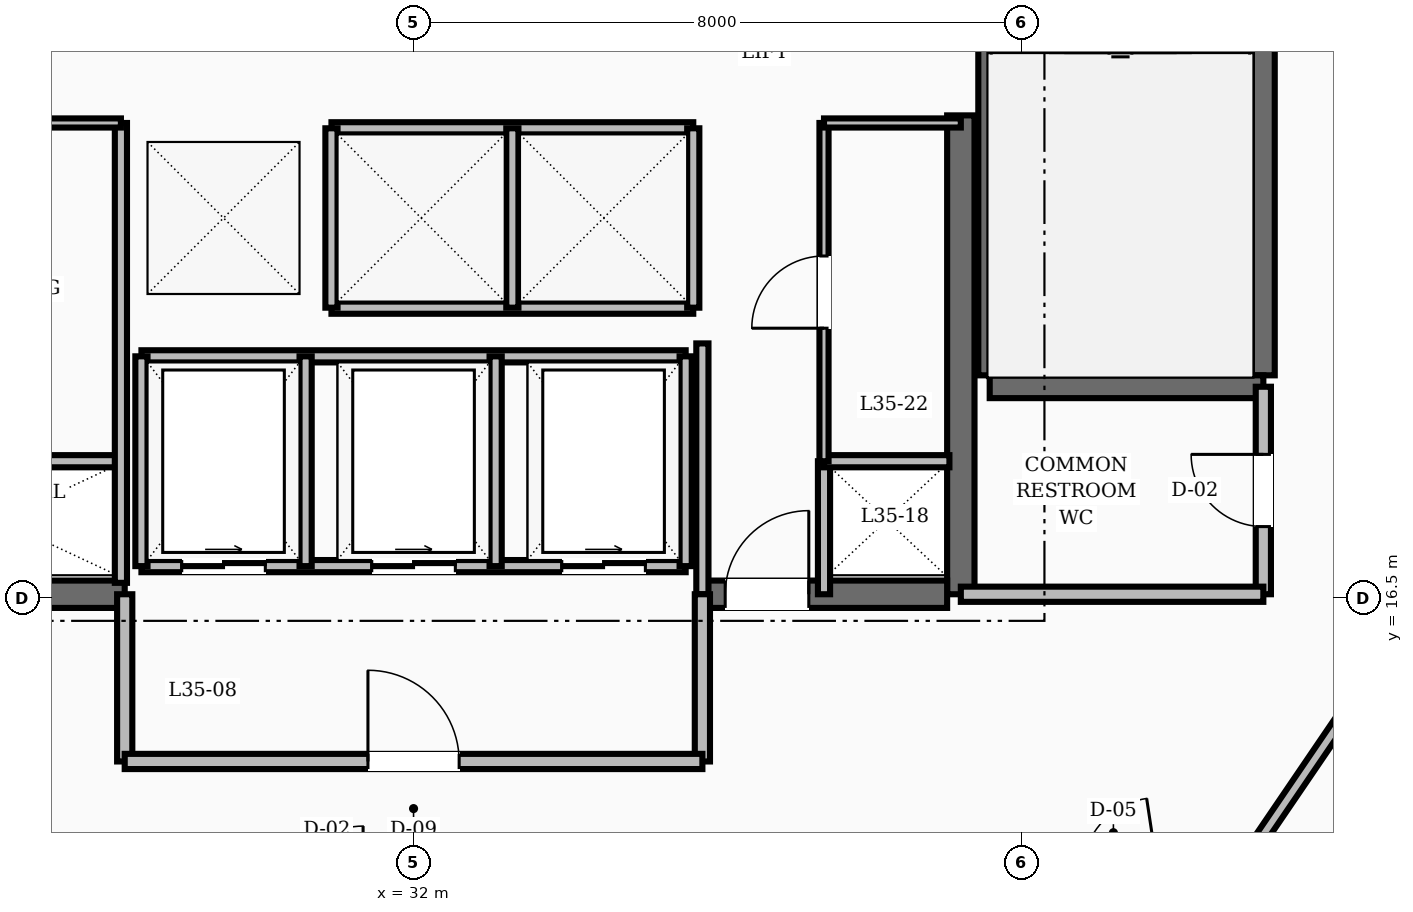
"""IFC4 building model, lengths in metres.
Left out: names, types, materials, properties, quantities, classifications, styles, units other than length and angle.
Written with IfcOpenShell. Run it as: python <this file> out.ifc"""

import sys

from ifc_helpers import new_model, si_unit, direction, frame, frame_2d, origin, place, context, subcontext, project, spatial, rectangle, extrude, element, fill, save


model = new_model("IFC4")
c1 = context("Model", 3, precision=1e-05, world=origin(), true_north=direction((0.0, 1.0)))
c2 = subcontext(c1, "Body", "Model", "MODEL_VIEW")
j1 = project(units=[si_unit("LENGTHUNIT", "METRE"), si_unit("PLANEANGLEUNIT", "RADIAN")], contexts=[c1])
p1 = place(None, origin())
s1 = spatial("IfcSite", under=j1, at=p1, CompositionType="ELEMENT")
p2 = place(p1, origin())
s2 = spatial("IfcBuilding", under=s1, at=p2, CompositionType="ELEMENT")
p3 = place(p2, frame((0.0, 0.0, 138.8)))
s3 = spatial("IfcBuildingStorey", under=s2, at=p3, CompositionType="ELEMENT", Elevation=138.8)
p4 = place(p3, frame((39.2, 16.55, 0.0), z_axis=(0.0, 0.0, 1.0), x_axis=(0.0, 1.0, 0.0)))
e1 = element("IfcWall", 1, at=p4, inside=s3, PredefinedType="SHEAR", context=c2, shape_type="SweptSolid", body=[
    extrude(rectangle(XDim=6.3, YDim=0.36, at=frame_2d((3.15, 0.0))), origin(), (0.0, 0.0, 1.0), 3.6),
])
p5 = place(p3, frame((24.98, 16.55, 0.0), z_axis=(0.0, 0.0, 1.0), x_axis=(1.0, 0.0, 0.0)))
e2 = element("IfcWall", 2, at=p5, inside=s3, PredefinedType="SHEAR", context=c2, shape_type="SweptSolid", body=[
    extrude(rectangle(XDim=3.22, YDim=0.36, at=frame_2d((1.61, 0.0))), origin(), (0.0, 0.0, 1.0), 3.6),
])
p6 = place(p3, frame((35.8, 16.55, 0.0), z_axis=(0.0, 0.0, 1.0), x_axis=(1.0, 0.0, 0.0)))
e3 = element("IfcWall", 3, at=p6, inside=s3, PredefinedType="SHEAR", context=c2, shape_type="SweptSolid", body=[
    extrude(rectangle(XDim=3.22, YDim=0.36, at=frame_2d((1.61, 0.0))), origin(), (0.0, 0.0, 1.0), 3.6),
])
p7 = place(p6, frame((0.3, 0.0, 0.0)))
e4 = element("IfcOpeningElement", 4, at=p7, cuts=e3, PredefinedType="OPENING", context=c2, shape_type="SweptSolid", body=[
    extrude(rectangle(XDim=1.1, YDim=2.1, at=frame_2d((0.55, 1.05))), frame((0.0, 0.19, 0.0), z_axis=(0.0, -1.0, 0.0), x_axis=(1.0, 0.0, 0.0)), (0.0, 0.0, 1.0), 0.38),
])
for number, where, z_axis, x_axis in (
    (5, (43.18, 19.43, 0.0), (0.0, 0.0, 1.0), (0.0, 1.0, 0.0)),
    (6, (39.58, 19.43, 0.0), (0.0, 0.0, 1.0), (0.0, 1.0, 0.0)),
):
    element("IfcWall", number, at=place(p3, frame(where, z_axis=z_axis, x_axis=x_axis)), inside=s3, PredefinedType="SHEAR", context=c2, shape_type="SweptSolid", body=[
        extrude(rectangle(XDim=8.74, YDim=0.3, at=frame_2d((4.37, 0.0))), origin(), (0.0, 0.0, 1.0), 3.6),
    ])
p8 = place(p3, frame((39.58, 19.28, 0.0), z_axis=(0.0, 0.0, 1.0), x_axis=(1.0, 0.0, 0.0)))
e7 = element("IfcWall", 7, at=p8, inside=s3, PredefinedType="SHEAR", context=c2, shape_type="SweptSolid", body=[
    extrude(rectangle(XDim=3.6, YDim=0.3, at=frame_2d((1.8, 0.0))), origin(), (0.0, 0.0, 1.0), 3.6),
])
p9 = place(p3, frame((43.18, 16.55, 0.0), z_axis=(0.0, 0.0, 1.0), x_axis=(0.0, 1.0, 0.0)))
e8 = element("IfcWall", 8, at=p9, inside=s3, PredefinedType="SOLIDWALL", context=c2, shape_type="SweptSolid", body=[
    extrude(rectangle(XDim=2.73, YDim=0.2, at=frame_2d((1.365, 0.0))), origin(), (0.0, 0.0, 1.0), 2.8),
])
p10 = place(p9, frame((0.89, 0.0, 0.0)))
e9 = element("IfcOpeningElement", 9, at=p10, cuts=e8, PredefinedType="OPENING", context=c2, shape_type="SweptSolid", body=[
    extrude(rectangle(XDim=0.95, YDim=2.1, at=frame_2d((0.475, 1.05))), frame((0.0, 0.11, 0.0), z_axis=(0.0, -1.0, 0.0), x_axis=(1.0, 0.0, 0.0)), (0.0, 0.0, 1.0), 0.22),
])
p11 = place(p3, frame((39.2, 16.55, 0.0), z_axis=(0.0, 0.0, 1.0), x_axis=(1.0, 0.0, 0.0)))
e10 = element("IfcWall", 10, at=p11, inside=s3, PredefinedType="SOLIDWALL", context=c2, shape_type="SweptSolid", body=[
    extrude(rectangle(XDim=3.98, YDim=0.2, at=frame_2d((1.99, 0.0))), origin(), (0.0, 0.0, 1.0), 2.8),
])
p12 = place(p3, frame((35.8, 16.55, 0.0), z_axis=(0.0, 0.0, 1.0), x_axis=(0.0, 1.0, 0.0)))
e11 = element("IfcWall", 11, at=p12, inside=s3, PredefinedType="SOLIDWALL", context=c2, shape_type="SweptSolid", body=[
    extrude(rectangle(XDim=3.3, YDim=0.16, at=frame_2d((1.65, 0.0))), origin(), (0.0, 0.0, 1.0), 2.8),
])
p13 = place(p3, frame((37.4, 16.55, 0.0), z_axis=(0.0, 0.0, 1.0), x_axis=(0.0, 1.0, 0.0)))
e12 = element("IfcWall", 12, at=p13, inside=s3, PredefinedType="SOLIDWALL", context=c2, shape_type="SweptSolid", body=[
    extrude(rectangle(XDim=1.75, YDim=0.16, at=frame_2d((0.875, 0.0))), origin(), (0.0, 0.0, 1.0), 2.8),
])
for number, where, z_axis, x_axis in (
    (13, (28.2, 14.35, 0.0), (0.0, 0.0, 1.0), (0.0, 1.0, 0.0)),
    (14, (35.8, 14.35, 0.0), (0.0, 0.0, 1.0), (0.0, 1.0, 0.0)),
):
    element("IfcWall", number, at=place(p3, frame(where, z_axis=z_axis, x_axis=x_axis)), inside=s3, PredefinedType="SOLIDWALL", context=c2, shape_type="SweptSolid", body=[
        extrude(rectangle(XDim=2.2, YDim=0.2, at=frame_2d((1.1, 0.0))), origin(), (0.0, 0.0, 1.0), 2.8),
    ])
p14 = place(p3, frame((28.2, 14.35, 0.0), z_axis=(0.0, 0.0, 1.0), x_axis=(1.0, 0.0, 0.0)))
e15 = element("IfcWall", 15, at=p14, inside=s3, PredefinedType="SOLIDWALL", context=c2, shape_type="SweptSolid", body=[
    extrude(rectangle(XDim=7.6, YDim=0.2, at=frame_2d((3.8, 0.0))), origin(), (0.0, 0.0, 1.0), 2.8),
])
p15 = place(p14, frame((3.2, 0.0, 0.0)))
e16 = element("IfcOpeningElement", 16, at=p15, cuts=e15, PredefinedType="OPENING", context=c2, shape_type="SweptSolid", body=[
    extrude(rectangle(XDim=1.2, YDim=2.1, at=frame_2d((0.6, 1.05))), frame((0.0, 0.11, 0.0), z_axis=(0.0, -1.0, 0.0), x_axis=(1.0, 0.0, 0.0)), (0.0, 0.0, 1.0), 0.22),
])
for number, where, z_axis, x_axis in (
    (17, (30.92, 22.68, 0.0), (0.0, 0.0, 1.0), (1.0, 0.0, 0.0)),
    (18, (30.92, 20.32, 0.0), (0.0, 0.0, 1.0), (1.0, 0.0, 0.0)),
):
    element("IfcWall", number, at=place(p3, frame(where, z_axis=z_axis, x_axis=x_axis)), inside=s3, PredefinedType="SOLIDWALL", context=c2, shape_type="SweptSolid", body=[
        extrude(rectangle(XDim=4.76, YDim=0.16, at=frame_2d((2.38, 0.0))), origin(), (0.0, 0.0, 1.0), 2.8),
    ])
for number, where, z_axis, x_axis in (
    (19, (30.92, 20.32, 0.0), (0.0, 0.0, 1.0), (0.0, 1.0, 0.0)),
    (20, (33.3, 20.32, 0.0), (0.0, 0.0, 1.0), (0.0, 1.0, 0.0)),
    (21, (35.68, 20.32, 0.0), (0.0, 0.0, 1.0), (0.0, 1.0, 0.0)),
):
    element("IfcWall", number, at=place(p3, frame(where, z_axis=z_axis, x_axis=x_axis)), inside=s3, PredefinedType="SOLIDWALL", context=c2, shape_type="SweptSolid", body=[
        extrude(rectangle(XDim=2.36, YDim=0.16, at=frame_2d((1.18, 0.0))), origin(), (0.0, 0.0, 1.0), 2.8),
    ])
p16 = place(p3, frame((28.42, 16.92, 0.0), z_axis=(0.0, 0.0, 1.0), x_axis=(1.0, 0.0, 0.0)))
e22 = element("IfcWall", 22, at=p16, inside=s3, PredefinedType="SOLIDWALL", context=c2, shape_type="SweptSolid", body=[
    extrude(rectangle(XDim=7.16, YDim=0.16, at=frame_2d((3.58, 0.0))), origin(), (0.0, 0.0, 1.0), 2.8),
])
p17 = place(p16, frame((0.53, 0.0, 0.0)))
e23 = element("IfcOpeningElement", 23, at=p17, cuts=e22, PredefinedType="OPENING", context=c2, shape_type="SweptSolid", body=[
    extrude(rectangle(XDim=1.1, YDim=2.15, at=frame_2d((0.55, 1.075))), frame((0.0, 0.09, 0.0), z_axis=(0.0, -1.0, 0.0), x_axis=(1.0, 0.0, 0.0)), (0.0, 0.0, 1.0), 0.18),
])
p18 = place(p16, frame((3.03, 0.0, 0.0)))
e24 = element("IfcOpeningElement", 24, at=p18, cuts=e22, PredefinedType="OPENING", context=c2, shape_type="SweptSolid", body=[
    extrude(rectangle(XDim=1.1, YDim=2.15, at=frame_2d((0.55, 1.075))), frame((0.0, 0.09, 0.0), z_axis=(0.0, -1.0, 0.0), x_axis=(1.0, 0.0, 0.0)), (0.0, 0.0, 1.0), 0.18),
])
p19 = place(p16, frame((5.53, 0.0, 0.0)))
e25 = element("IfcOpeningElement", 25, at=p19, cuts=e22, PredefinedType="OPENING", context=c2, shape_type="SweptSolid", body=[
    extrude(rectangle(XDim=1.1, YDim=2.15, at=frame_2d((0.55, 1.075))), frame((0.0, 0.09, 0.0), z_axis=(0.0, -1.0, 0.0), x_axis=(1.0, 0.0, 0.0)), (0.0, 0.0, 1.0), 0.18),
])
p20 = place(p3, frame((28.42, 19.68, 0.0), z_axis=(0.0, 0.0, 1.0), x_axis=(1.0, 0.0, 0.0)))
e26 = element("IfcWall", 26, at=p20, inside=s3, PredefinedType="SOLIDWALL", context=c2, shape_type="SweptSolid", body=[
    extrude(rectangle(XDim=7.16, YDim=0.16, at=frame_2d((3.58, 0.0))), origin(), (0.0, 0.0, 1.0), 2.8),
])
for number, where, z_axis, x_axis in (
    (27, (28.42, 16.92, 0.0), (0.0, 0.0, 1.0), (0.0, 1.0, 0.0)),
    (28, (30.58, 16.92, 0.0), (0.0, 0.0, 1.0), (0.0, 1.0, 0.0)),
    (29, (33.08, 16.92, 0.0), (0.0, 0.0, 1.0), (0.0, 1.0, 0.0)),
    (30, (35.58, 16.92, 0.0), (0.0, 0.0, 1.0), (0.0, 1.0, 0.0)),
):
    element("IfcWall", number, at=place(p3, frame(where, z_axis=z_axis, x_axis=x_axis)), inside=s3, PredefinedType="SOLIDWALL", context=c2, shape_type="SweptSolid", body=[
        extrude(rectangle(XDim=2.76, YDim=0.16, at=frame_2d((1.38, 0.0))), origin(), (0.0, 0.0, 1.0), 2.8),
    ])
p21 = place(p3, frame((24.95, 18.3, 0.0), z_axis=(0.0, 0.0, 1.0), x_axis=(1.0, 0.0, 0.0)))
e31 = element("IfcWall", 31, at=p21, inside=s3, PredefinedType="SOLIDWALL", context=c2, shape_type="SweptSolid", body=[
    extrude(rectangle(XDim=3.2, YDim=0.16, at=frame_2d((1.6, 0.0))), origin(), (0.0, 0.0, 1.0), 2.8),
])
p22 = place(p3, frame((28.15, 16.7, 0.0), z_axis=(0.0, 0.0, 1.0), x_axis=(0.0, 1.0, 0.0)))
e32 = element("IfcWall", 32, at=p22, inside=s3, PredefinedType="SOLIDWALL", context=c2, shape_type="SweptSolid", body=[
    extrude(rectangle(XDim=6.05, YDim=0.16, at=frame_2d((3.025, 0.0))), origin(), (0.0, 0.0, 1.0), 2.8),
])
p23 = place(p3, frame((37.4, 18.3, 0.0), z_axis=(0.0, 0.0, 1.0), x_axis=(1.0, 0.0, 0.0)))
e33 = element("IfcWall", 33, at=p23, inside=s3, PredefinedType="SOLIDWALL", context=c2, shape_type="SweptSolid", body=[
    extrude(rectangle(XDim=1.65, YDim=0.16, at=frame_2d((0.825, 0.0))), origin(), (0.0, 0.0, 1.0), 2.8),
])
p24 = place(p3, frame((24.95, 22.75, 0.0), z_axis=(0.0, 0.0, 1.0), x_axis=(1.0, 0.0, 0.0)))
e34 = element("IfcWall", 34, at=p24, inside=s3, PredefinedType="PARTITIONING", context=c2, shape_type="SweptSolid", body=[
    extrude(rectangle(XDim=3.2, YDim=0.12, at=frame_2d((1.6, 0.0))), origin(), (0.0, 0.0, 1.0), 2.8),
])
p25 = place(p24, frame((1.125, 0.0, 0.0)))
e35 = element("IfcOpeningElement", 35, at=p25, cuts=e34, PredefinedType="OPENING", context=c2, shape_type="SweptSolid", body=[
    extrude(rectangle(XDim=0.95, YDim=2.1, at=frame_2d((0.475, 1.05))), frame((0.0, 0.07, 0.0), z_axis=(0.0, -1.0, 0.0), x_axis=(1.0, 0.0, 0.0)), (0.0, 0.0, 1.0), 0.14),
])
p26 = place(p3, frame((37.4, 18.3, 0.0), z_axis=(0.0, 0.0, 1.0), x_axis=(0.0, 1.0, 0.0)))
e36 = element("IfcWall", 36, at=p26, inside=s3, PredefinedType="PARTITIONING", context=c2, shape_type="SweptSolid", body=[
    extrude(rectangle(XDim=4.45, YDim=0.12, at=frame_2d((2.225, 0.0))), origin(), (0.0, 0.0, 1.0), 2.8),
])
p27 = place(p26, frame((1.75, 0.0, 0.0)))
e37 = element("IfcOpeningElement", 37, at=p27, cuts=e36, PredefinedType="OPENING", context=c2, shape_type="SweptSolid", body=[
    extrude(rectangle(XDim=0.95, YDim=2.1, at=frame_2d((0.475, 1.05))), frame((0.0, 0.07, 0.0), z_axis=(0.0, -1.0, 0.0), x_axis=(1.0, 0.0, 0.0)), (0.0, 0.0, 1.0), 0.14),
])
p28 = place(p3, frame((37.4, 22.75, 0.0), z_axis=(0.0, 0.0, 1.0), x_axis=(1.0, 0.0, 0.0)))
e38 = element("IfcWall", 38, at=p28, inside=s3, PredefinedType="PARTITIONING", context=c2, shape_type="SweptSolid", body=[
    extrude(rectangle(XDim=1.8, YDim=0.12, at=frame_2d((0.9, 0.0))), origin(), (0.0, 0.0, 1.0), 2.8),
])
p29 = place(p3, frame((42.95, 13.05, 0.0), z_axis=(0.0, 0.0, 1.0), x_axis=(0.562674669208, 0.826678423955, 0.0)))
e39 = element("IfcWall", 39, at=p29, inside=s3, PredefinedType="SOLIDWALL", context=c2, shape_type="SweptSolid", body=[
    extrude(rectangle(XDim=3.021, YDim=0.16, at=frame_2d((1.511, 0.0))), origin(), (0.0, 0.0, 1.0), 2.8),
])
p30 = place(p10, origin())
e40 = element("IfcDoor", 40, at=p30, inside=s3, OperationType="SINGLE_SWING_RIGHT", PredefinedType="DOOR", context=c2, shape_type="SweptSolid", body=[
    extrude(rectangle(XDim=0.95, YDim=2.1, at=frame_2d((0.475, 1.05))), frame((0.0, 0.025, 0.0), z_axis=(0.0, -1.0, 0.0), x_axis=(1.0, 0.0, 0.0)), (0.0, 0.0, 1.0), 0.05),
])
fill(e9, e40)
p31 = place(p7, origin())
e41 = element("IfcDoor", 41, at=p31, inside=s3, OperationType="SINGLE_SWING_RIGHT", PredefinedType="DOOR", context=c2, shape_type="SweptSolid", body=[
    extrude(rectangle(XDim=1.1, YDim=2.1, at=frame_2d((0.55, 1.05))), frame((0.0, 0.025, 0.0), z_axis=(0.0, -1.0, 0.0), x_axis=(1.0, 0.0, 0.0)), (0.0, 0.0, 1.0), 0.05),
])
fill(e4, e41)
p32 = place(p15, origin())
e42 = element("IfcDoor", 42, at=p32, inside=s3, OperationType="SINGLE_SWING_LEFT", PredefinedType="DOOR", context=c2, shape_type="SweptSolid", body=[
    extrude(rectangle(XDim=1.2, YDim=2.1, at=frame_2d((0.6, 1.05))), frame((0.0, 0.025, 0.0), z_axis=(0.0, -1.0, 0.0), x_axis=(1.0, 0.0, 0.0)), (0.0, 0.0, 1.0), 0.05),
])
fill(e16, e42)
p33 = place(p17, origin())
e43 = element("IfcDoor", 43, at=p33, inside=s3, OperationType="SLIDING_TO_RIGHT", PredefinedType="DOOR", context=c2, shape_type="SweptSolid", body=[
    extrude(rectangle(XDim=1.1, YDim=2.15, at=frame_2d((0.55, 1.075))), frame((0.0, 0.025, 0.0), z_axis=(0.0, -1.0, 0.0), x_axis=(1.0, 0.0, 0.0)), (0.0, 0.0, 1.0), 0.05),
])
fill(e23, e43)
p34 = place(p18, origin())
e44 = element("IfcDoor", 44, at=p34, inside=s3, OperationType="SLIDING_TO_RIGHT", PredefinedType="DOOR", context=c2, shape_type="SweptSolid", body=[
    extrude(rectangle(XDim=1.1, YDim=2.15, at=frame_2d((0.55, 1.075))), frame((0.0, 0.025, 0.0), z_axis=(0.0, -1.0, 0.0), x_axis=(1.0, 0.0, 0.0)), (0.0, 0.0, 1.0), 0.05),
])
fill(e24, e44)
p35 = place(p19, origin())
e45 = element("IfcDoor", 45, at=p35, inside=s3, OperationType="SLIDING_TO_RIGHT", PredefinedType="DOOR", context=c2, shape_type="SweptSolid", body=[
    extrude(rectangle(XDim=1.1, YDim=2.15, at=frame_2d((0.55, 1.075))), frame((0.0, 0.025, 0.0), z_axis=(0.0, -1.0, 0.0), x_axis=(1.0, 0.0, 0.0)), (0.0, 0.0, 1.0), 0.05),
])
fill(e25, e45)
p36 = place(p27, origin())
e46 = element("IfcDoor", 46, at=p36, inside=s3, OperationType="SINGLE_SWING_LEFT", PredefinedType="DOOR", context=c2, shape_type="SweptSolid", body=[
    extrude(rectangle(XDim=0.95, YDim=2.1, at=frame_2d((0.475, 1.05))), frame((0.0, 0.025, 0.0), z_axis=(0.0, -1.0, 0.0), x_axis=(1.0, 0.0, 0.0)), (0.0, 0.0, 1.0), 0.05),
])
fill(e37, e46)
save(model, sys.argv[1])
